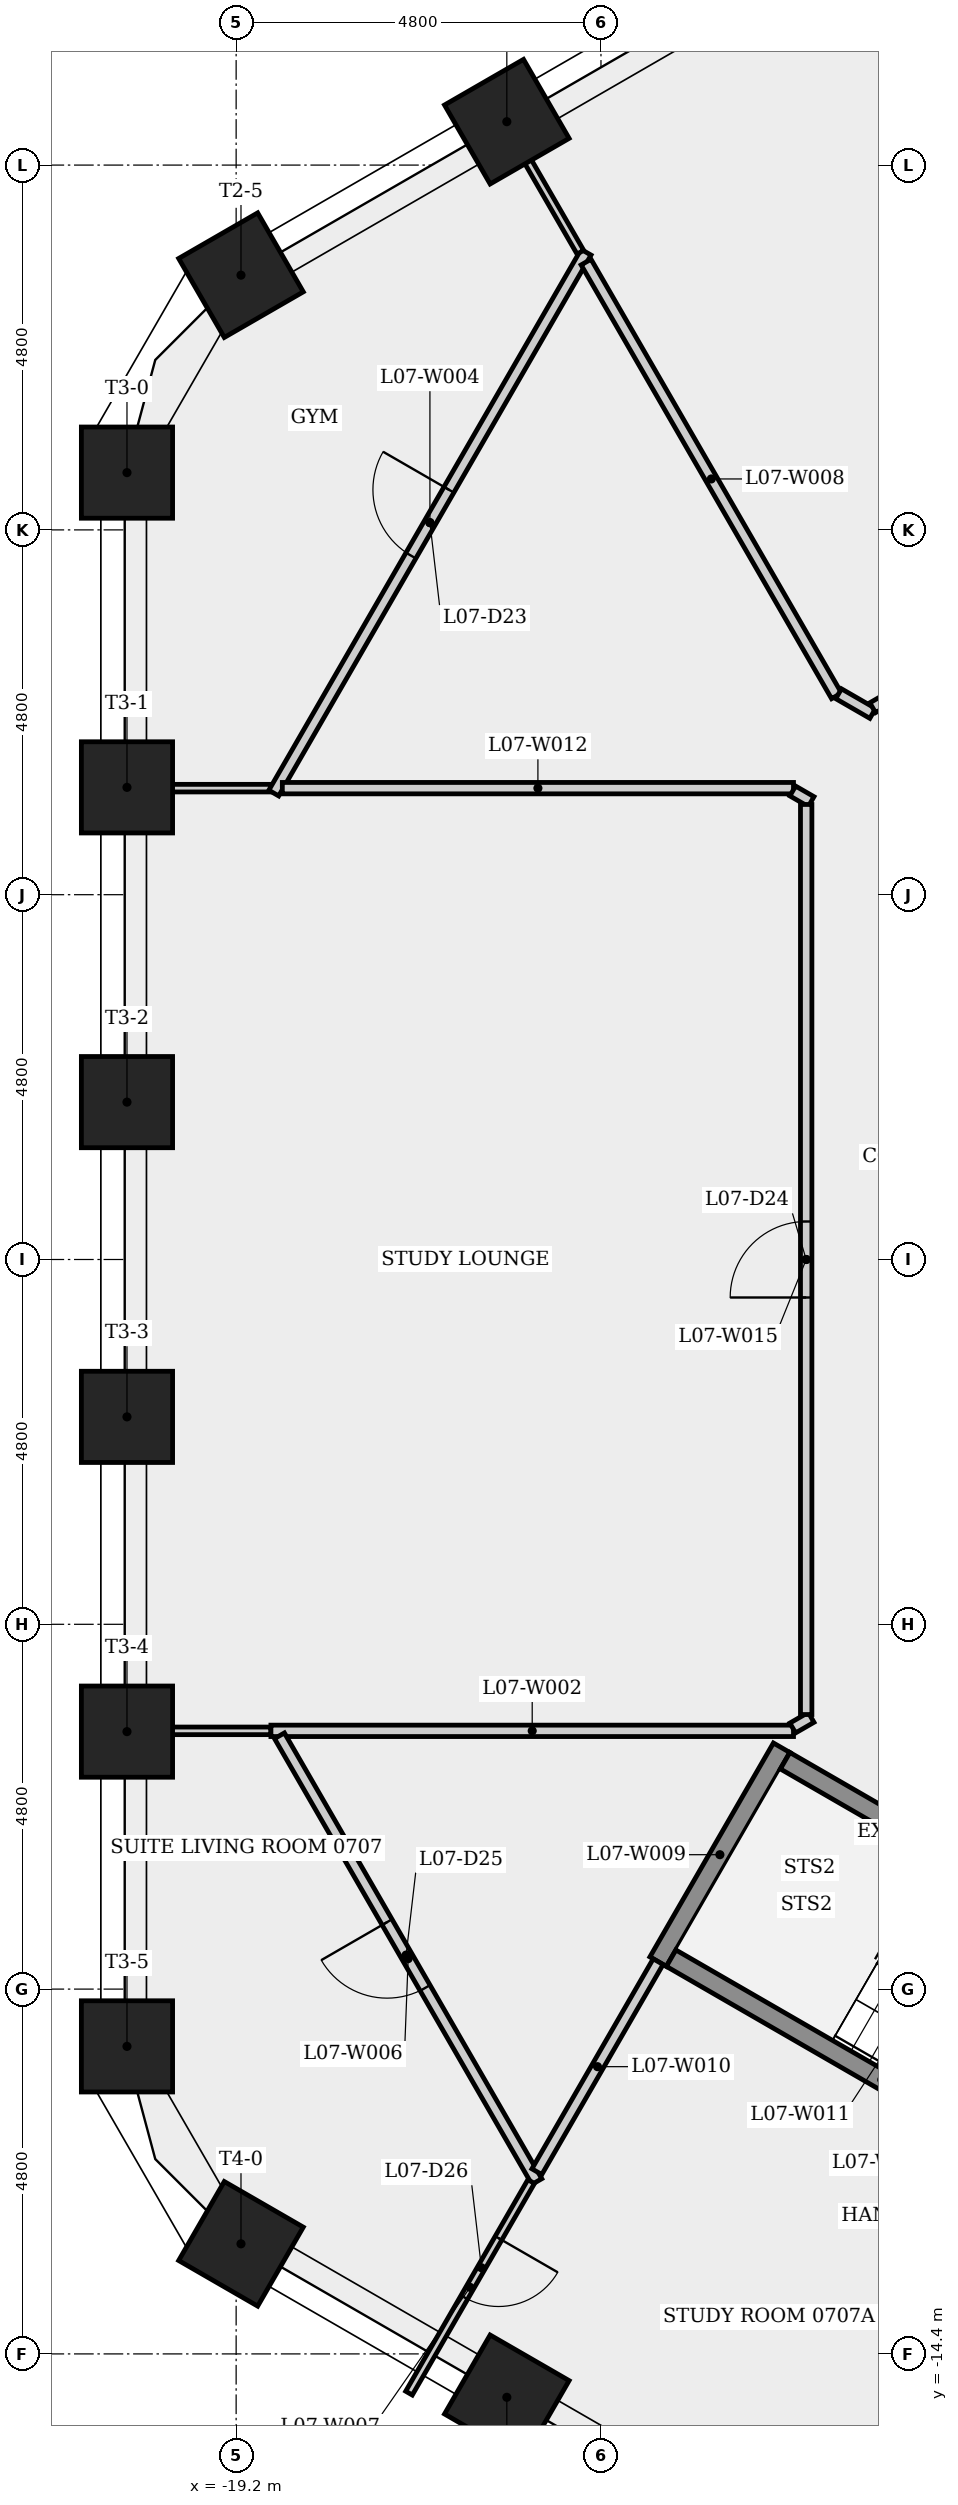
"""IFC4 building model, lengths in metres.
Left out: names, types, materials, properties, quantities, classifications, styles, units other than length and angle.
Written with IfcOpenShell. Run it as: python <this file> out.ifc"""

import sys

from ifc_helpers import new_model, si_unit, direction, frame, frame_2d, origin, origin_2d, place, context, subcontext, project, spatial, rectangle, extrude, element, fill, save


model = new_model("IFC4")
c1 = context("Model", 3, precision=1e-05, world=origin(), true_north=direction((0.0, 1.0)))
c2 = subcontext(c1, "Body", "Model", "MODEL_VIEW")
j1 = project(units=[si_unit("LENGTHUNIT", "METRE"), si_unit("PLANEANGLEUNIT", "RADIAN")], contexts=[c1])
p1 = place(None, origin())
s1 = spatial("IfcSite", under=j1, at=p1, CompositionType="ELEMENT")
p2 = place(p1, origin())
s2 = spatial("IfcBuilding", under=s1, at=p2, CompositionType="ELEMENT")
p3 = place(p2, frame((0.0, 0.0, 32.3)))
s3 = spatial("IfcBuildingStorey", under=s2, at=p3, CompositionType="ELEMENT", Elevation=32.3)
for number, where, z_axis, x_axis in (
    (1, (-15.639, 14.971, 0.0), (0.0, 0.0, 1.0), (-0.5, 0.866, 0.0)),
    (2, (-19.136, 12.952, 0.0), (0.0, 0.0, 1.0), (-0.5, 0.866, 0.0)),
    (3, (-20.636, 10.354, 0.0), (0.0, 0.0, 1.0), (-1.0, 0.0, 0.0)),
    (4, (-20.636, 6.212, 0.0), (0.0, 0.0, 1.0), (-1.0, 0.0, 0.0)),
    (5, (-20.636, 2.071, 0.0), (0.0, 0.0, 1.0), (-1.0, 0.0, 0.0)),
    (6, (-20.636, -2.071, 0.0), (0.0, 0.0, 1.0), (-1.0, 0.0, 0.0)),
    (7, (-20.636, -6.212, 0.0), (0.0, 0.0, 1.0), (-1.0, 0.0, 0.0)),
    (8, (-20.636, -10.354, 0.0), (0.0, 0.0, 1.0), (-1.0, 0.0, 0.0)),
    (9, (-19.136, -12.952, 0.0), (0.0, 0.0, 1.0), (-0.5, -0.866, 0.0)),
    (10, (-15.639, -14.971, 0.0), (0.0, 0.0, 1.0), (-0.5, -0.866, 0.0)),
):
    element("IfcColumn", number, at=place(p3, frame(where, z_axis=z_axis, x_axis=x_axis)), inside=s3, PredefinedType="COLUMN", context=c2, shape_type="SweptSolid", body=[
        extrude(rectangle(XDim=1.2, YDim=1.2, at=origin_2d()), origin(), (0.0, 0.0, 1.0), 3.4),
    ])
p4 = place(p3, frame((-18.742, -6.202, 0.0), z_axis=(0.0, 0.0, 1.0), x_axis=(-1.0, 0.0, 0.0)))
e11 = element("IfcWall", 11, at=p4, inside=s3, PredefinedType="PARTITIONING", context=c2, shape_type="SweptSolid", body=[
    extrude(rectangle(XDim=1.924, YDim=0.1, at=frame_2d((0.962, 0.0))), origin(), (0.0, 0.0, 1.0), 3.05),
])
p5 = place(p3, frame((-18.742, -6.202, 0.0), z_axis=(0.0, 0.0, 1.0), x_axis=(1.0, 0.0, 0.0)))
e12 = element("IfcWall", 12, at=p5, inside=s3, PredefinedType="PARTITIONING", context=c2, shape_type="SweptSolid", body=[
    extrude(rectangle(XDim=6.875, YDim=0.15, at=frame_2d((3.438, 0.0))), origin(), (0.0, 0.0, 1.0), 3.05),
])
p6 = place(p3, frame((-18.742, 6.202, 0.0), z_axis=(0.0, 0.0, 1.0), x_axis=(-1.0, 0.0, 0.0)))
e13 = element("IfcWall", 13, at=p6, inside=s3, PredefinedType="PARTITIONING", context=c2, shape_type="SweptSolid", body=[
    extrude(rectangle(XDim=1.924, YDim=0.1, at=frame_2d((0.962, 0.0))), origin(), (0.0, 0.0, 1.0), 3.05),
])
p7 = place(p3, frame((-18.705, 6.137, 0.0), z_axis=(0.0, 0.0, 1.0), x_axis=(0.499992475648, 0.866029747927, 0.0)))
e14 = element("IfcWall", 14, at=p7, inside=s3, PredefinedType="PARTITIONING", context=c2, shape_type="SweptSolid", body=[
    extrude(rectangle(XDim=8.218, YDim=0.15, at=frame_2d((4.109, 0.0))), origin(), (0.0, 0.0, 1.0), 3.05),
])
p8 = place(p7, frame((3.609, 0.0, 0.0)))
e15 = element("IfcOpeningElement", 15, at=p8, cuts=e14, PredefinedType="OPENING", context=c2, shape_type="SweptSolid", body=[
    extrude(rectangle(XDim=1.0, YDim=2.1, at=frame_2d((0.5, 1.05))), frame((0.0, 0.085, 0.0), z_axis=(0.0, -1.0, 0.0), x_axis=(1.0, 0.0, 0.0)), (0.0, 0.0, 1.0), 0.17),
])
p9 = place(p3, frame((-15.656, 14.961, 0.0), z_axis=(0.0, 0.0, 1.0), x_axis=(0.500069143596, -0.86598548003, 0.0)))
e16 = element("IfcWall", 16, at=p9, inside=s3, PredefinedType="PARTITIONING", context=c2, shape_type="SweptSolid", body=[
    extrude(rectangle(XDim=1.971, YDim=0.1, at=frame_2d((0.985, 0.0))), origin(), (0.0, 0.0, 1.0), 3.05),
])
p10 = place(p3, frame((-15.243, -12.132, 0.0), z_axis=(0.0, 0.0, 1.0), x_axis=(-0.500004319728, 0.866022909774, 0.0)))
e17 = element("IfcWall", 17, at=p10, inside=s3, PredefinedType="PARTITIONING", context=c2, shape_type="SweptSolid", body=[
    extrude(rectangle(XDim=6.773, YDim=0.15, at=frame_2d((3.386, 0.0))), origin(), (0.0, 0.0, 1.0), 3.05),
])
p11 = place(p10, frame((2.941, 0.0, 0.0)))
e18 = element("IfcOpeningElement", 18, at=p11, cuts=e17, PredefinedType="OPENING", context=c2, shape_type="SweptSolid", body=[
    extrude(rectangle(XDim=1.0, YDim=2.1, at=frame_2d((0.5, 1.05))), frame((0.0, 0.085, 0.0), z_axis=(0.0, -1.0, 0.0), x_axis=(1.0, 0.0, 0.0)), (0.0, 0.0, 1.0), 0.17),
])
p12 = place(p3, frame((-15.318, -12.132, 0.0), z_axis=(0.0, 0.0, 1.0), x_axis=(-0.500027048631, -0.866009786687, 0.0)))
e19 = element("IfcWall", 19, at=p12, inside=s3, PredefinedType="PARTITIONING", context=c2, shape_type="SweptSolid", body=[
    extrude(rectangle(XDim=3.215, YDim=0.1, at=frame_2d((1.607, 0.0))), origin(), (0.0, 0.0, 1.0), 3.05),
])
p13 = place(p12, frame((0.859, 0.0, 0.0)))
e20 = element("IfcOpeningElement", 20, at=p13, cuts=e19, PredefinedType="OPENING", context=c2, shape_type="SweptSolid", body=[
    extrude(rectangle(XDim=0.9, YDim=2.1, at=frame_2d((0.45, 1.05))), frame((0.0, 0.06, 0.0), z_axis=(0.0, -1.0, 0.0), x_axis=(1.0, 0.0, 0.0)), (0.0, 0.0, 1.0), 0.12),
])
p14 = place(p3, frame((-14.596, 13.124, 0.0), z_axis=(0.0, 0.0, 1.0), x_axis=(0.500007856214, -0.86602086795, 0.0)))
e21 = element("IfcWall", 21, at=p14, inside=s3, PredefinedType="PARTITIONING", context=c2, shape_type="SweptSolid", body=[
    extrude(rectangle(XDim=6.59, YDim=0.15, at=frame_2d((3.295, 0.0))), origin(), (0.0, 0.0, 1.0), 3.05),
])
p15 = place(p3, frame((-13.648, -9.239, 0.0), z_axis=(0.0, 0.0, 1.0), x_axis=(0.500017246033, 0.866015446554, 0.0)))
e22 = element("IfcWall", 22, at=p15, inside=s3, PredefinedType="SHEAR", context=c2, shape_type="SweptSolid", body=[
    extrude(rectangle(XDim=3.25, YDim=0.25, at=frame_2d((1.625, 0.0))), origin(), (0.0, 0.0, 1.0), 3.05),
])
p16 = place(p3, frame((-13.648, -9.239, 0.0), z_axis=(0.0, 0.0, 1.0), x_axis=(-0.50002266109, -0.866012320003, 0.0)))
e23 = element("IfcWall", 23, at=p16, inside=s3, PredefinedType="PARTITIONING", context=c2, shape_type="SweptSolid", body=[
    extrude(rectangle(XDim=3.191, YDim=0.15, at=frame_2d((1.596, 0.0))), origin(), (0.0, 0.0, 1.0), 3.05),
])
p17 = place(p3, frame((-11.977, -6.595, 0.0), z_axis=(0.0, 0.0, 1.0), x_axis=(0.866025499775, -0.499999833739, 0.0)))
e24 = element("IfcWall", 24, at=p17, inside=s3, PredefinedType="SHEAR", context=c2, shape_type="SweptSolid", body=[
    extrude(rectangle(XDim=6.4, YDim=0.25, at=frame_2d((3.2, 0.0))), origin(), (0.0, 0.0, 1.0), 3.05),
])
p18 = place(p17, frame((5.025, 0.0, 0.0)))
e25 = element("IfcOpeningElement", 25, at=p18, cuts=e24, PredefinedType="OPENING", context=c2, shape_type="SweptSolid", body=[
    extrude(rectangle(XDim=1.0, YDim=2.1, at=frame_2d((0.5, 1.05))), frame((0.0, 0.135, 0.0), z_axis=(0.0, -1.0, 0.0), x_axis=(1.0, 0.0, 0.0)), (0.0, 0.0, 1.0), 0.27),
])
p19 = place(p3, frame((-11.867, 6.202, 0.0), z_axis=(0.0, 0.0, 1.0), x_axis=(-1.0, 0.0, 0.0)))
e26 = element("IfcWall", 26, at=p19, inside=s3, PredefinedType="PARTITIONING", context=c2, shape_type="SweptSolid", body=[
    extrude(rectangle(XDim=6.725, YDim=0.15, at=frame_2d((3.363, 0.0))), origin(), (0.0, 0.0, 1.0), 3.05),
])
for number, where, z_axis, x_axis in (
    (27, (-11.877, -6.164, 0.0), (0.0, 0.0, 1.0), (0.866, 0.5, 0.0)),
    (28, (-11.635, 6.025, 0.0), (0.0, 0.0, 1.0), (-0.866, 0.5, 0.0)),
):
    element("IfcWall", number, at=place(p3, frame(where, z_axis=z_axis, x_axis=x_axis)), inside=s3, PredefinedType="PARTITIONING", context=c2, shape_type="SweptSolid", body=[
        extrude(rectangle(XDim=0.279, YDim=0.15, at=frame_2d((0.14, 0.0))), origin(), (0.0, 0.0, 1.0), 3.05),
    ])
p20 = place(p3, frame((-11.7, -5.987, 0.0), z_axis=(0.0, 0.0, 1.0), x_axis=(0.0, 1.0, 0.0)))
e29 = element("IfcWall", 29, at=p20, inside=s3, PredefinedType="PARTITIONING", context=c2, shape_type="SweptSolid", body=[
    extrude(rectangle(XDim=11.975, YDim=0.15, at=frame_2d((5.987, 0.0))), origin(), (0.0, 0.0, 1.0), 3.05),
])
p21 = place(p20, frame((5.487, 0.0, 0.0)))
e30 = element("IfcOpeningElement", 30, at=p21, cuts=e29, PredefinedType="OPENING", context=c2, shape_type="SweptSolid", body=[
    extrude(rectangle(XDim=1.0, YDim=2.1, at=frame_2d((0.5, 1.05))), frame((0.0, 0.085, 0.0), z_axis=(0.0, -1.0, 0.0), x_axis=(1.0, 0.0, 0.0)), (0.0, 0.0, 1.0), 0.17),
])
p22 = place(p3, frame((-11.273, 7.444, 0.0), z_axis=(0.0, 0.0, 1.0), x_axis=(0.866146335282, -0.499790481981, 0.0)))
e31 = element("IfcWall", 31, at=p22, inside=s3, PredefinedType="PARTITIONING", context=c2, shape_type="SweptSolid", body=[
    extrude(rectangle(XDim=0.518, YDim=0.15, at=frame_2d((0.259, 0.0))), origin(), (0.0, 0.0, 1.0), 3.05),
])
p23 = place(p3, frame((-10.825, 7.26, 0.0), z_axis=(0.0, 0.0, 1.0), x_axis=(0.866025463095, 0.499999897272, 0.0)))
e32 = element("IfcWall", 32, at=p23, inside=s3, PredefinedType="PARTITIONING", context=c2, shape_type="SweptSolid", body=[
    extrude(rectangle(XDim=11.807, YDim=0.15, at=frame_2d((5.903, 0.0))), origin(), (0.0, 0.0, 1.0), 3.05),
])
p24 = place(p23, frame((5.403, 0.0, 0.0)))
e33 = element("IfcOpeningElement", 33, at=p24, cuts=e32, PredefinedType="OPENING", context=c2, shape_type="SweptSolid", body=[
    extrude(rectangle(XDim=1.0, YDim=2.1, at=frame_2d((0.5, 1.05))), frame((0.0, 0.085, 0.0), z_axis=(0.0, -1.0, 0.0), x_axis=(1.0, 0.0, 0.0)), (0.0, 0.0, 1.0), 0.17),
])
p25 = place(p3, frame((-7.935, -12.393, 0.0), z_axis=(0.0, 0.0, 1.0), x_axis=(-0.866025499775, 0.499999833739, 0.0)))
e34 = element("IfcWall", 34, at=p25, inside=s3, PredefinedType="SHEAR", context=c2, shape_type="SweptSolid", body=[
    extrude(rectangle(XDim=6.4, YDim=0.25, at=frame_2d((3.2, 0.0))), origin(), (0.0, 0.0, 1.0), 3.05),
])
p26 = place(p8, origin())
e35 = element("IfcDoor", 35, at=p26, inside=s3, OperationType="SINGLE_SWING_RIGHT", PredefinedType="DOOR", context=c2, shape_type="SweptSolid", body=[
    extrude(rectangle(XDim=1.0, YDim=2.1, at=frame_2d((0.5, 1.05))), frame((0.0, 0.025, 0.0), z_axis=(0.0, -1.0, 0.0), x_axis=(1.0, 0.0, 0.0)), (0.0, 0.0, 1.0), 0.05),
])
fill(e15, e35)
p27 = place(p21, origin())
e36 = element("IfcDoor", 36, at=p27, inside=s3, OperationType="SINGLE_SWING_LEFT", PredefinedType="DOOR", context=c2, shape_type="SweptSolid", body=[
    extrude(rectangle(XDim=1.0, YDim=2.1, at=frame_2d((0.5, 1.05))), frame((0.0, 0.025, 0.0), z_axis=(0.0, -1.0, 0.0), x_axis=(1.0, 0.0, 0.0)), (0.0, 0.0, 1.0), 0.05),
])
fill(e30, e36)
p28 = place(p11, origin())
e37 = element("IfcDoor", 37, at=p28, inside=s3, OperationType="SINGLE_SWING_RIGHT", PredefinedType="DOOR", context=c2, shape_type="SweptSolid", body=[
    extrude(rectangle(XDim=1.0, YDim=2.1, at=frame_2d((0.5, 1.05))), frame((0.0, 0.025, 0.0), z_axis=(0.0, -1.0, 0.0), x_axis=(1.0, 0.0, 0.0)), (0.0, 0.0, 1.0), 0.05),
])
fill(e18, e37)
p29 = place(p13, origin())
e38 = element("IfcDoor", 38, at=p29, inside=s3, OperationType="SINGLE_SWING_LEFT", PredefinedType="DOOR", context=c2, shape_type="SweptSolid", body=[
    extrude(rectangle(XDim=0.9, YDim=2.1, at=frame_2d((0.45, 1.05))), frame((0.0, 0.025, 0.0), z_axis=(0.0, -1.0, 0.0), x_axis=(1.0, 0.0, 0.0)), (0.0, 0.0, 1.0), 0.05),
])
fill(e20, e38)
save(model, sys.argv[1])
